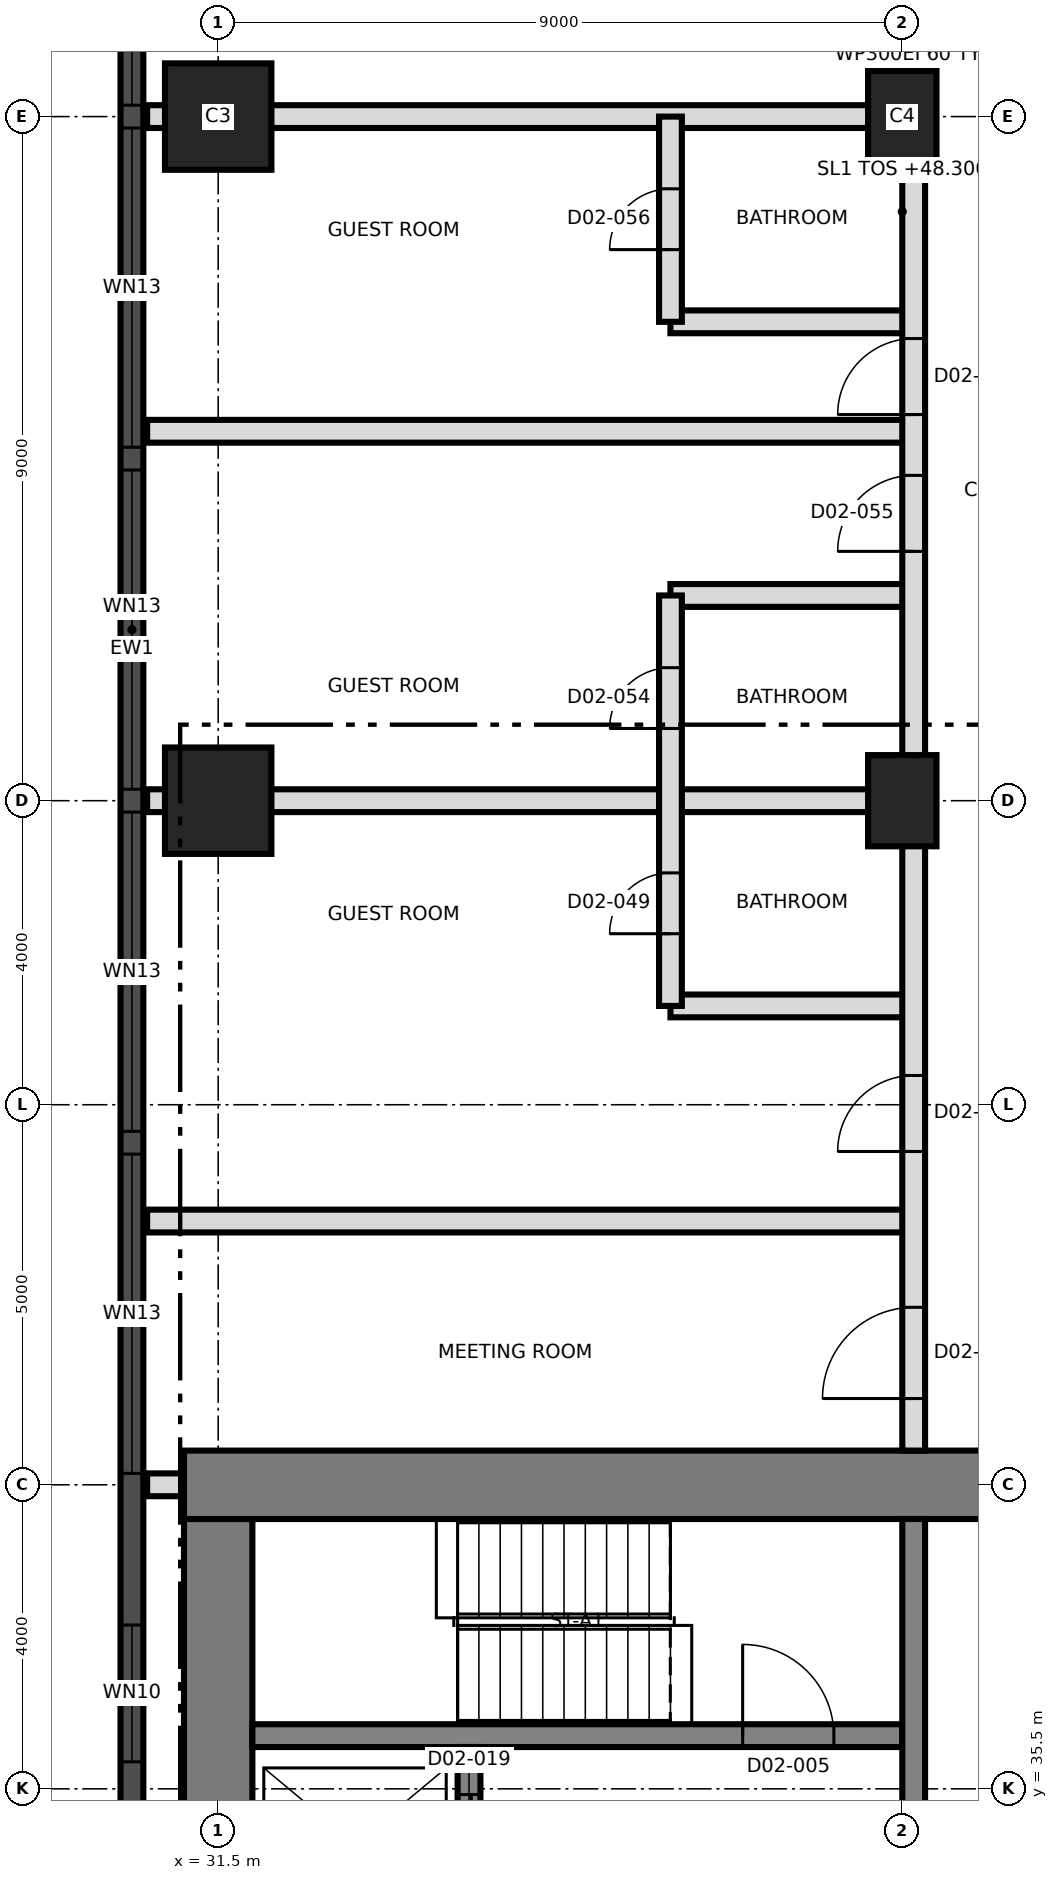
"""IFC4 building model, lengths in metres.
Left out: names, types, materials, properties, quantities, classifications, styles, units other than length and angle.
Written with IfcOpenShell. Run it as: python <this file> out.ifc"""

import sys

from ifc_helpers import new_model, si_unit, direction, frame, frame_2d, origin, origin_2d, place, context, subcontext, project, spatial, rectangle, extrude, element, fill, save


model = new_model("IFC4")
c1 = context("Model", 3, precision=1e-05, world=origin(), true_north=direction((0.0, 1.0)))
c2 = subcontext(c1, "Body", "Model", "MODEL_VIEW")
j1 = project(units=[si_unit("LENGTHUNIT", "METRE"), si_unit("PLANEANGLEUNIT", "RADIAN")], contexts=[c1])
p1 = place(None, origin())
s1 = spatial("IfcSite", under=j1, at=p1, CompositionType="ELEMENT")
p2 = place(p1, origin())
s2 = spatial("IfcBuilding", under=s1, at=p2, CompositionType="ELEMENT")
p3 = place(p2, frame((0.0, 0.0, 48.3)))
s3 = spatial("IfcBuildingStorey", under=s2, at=p3, CompositionType="ELEMENT", Elevation=48.3)
p4 = place(p3, frame((31.5, 21.95, 0.0), z_axis=(0.0, 0.0, 1.0), x_axis=(0.0, 1.0, 0.0)))
e1 = element("IfcWall", 1, at=p4, inside=s3, PredefinedType="SHEAR", context=c2, shape_type="SweptSolid", body=[
    extrude(rectangle(XDim=17.1, YDim=0.9, at=frame_2d((8.55, 0.0))), origin(), (0.0, 0.0, 1.0), 3.7),
])
p5 = place(p3, frame((31.05, 39.5, 0.0), z_axis=(0.0, 0.0, 1.0), x_axis=(1.0, 0.0, 0.0)))
e2 = element("IfcWall", 2, at=p5, inside=s3, PredefinedType="SHEAR", context=c2, shape_type="SweptSolid", body=[
    extrude(rectangle(XDim=27.0, YDim=0.9, at=frame_2d((13.5, 0.0))), origin(), (0.0, 0.0, 1.0), 3.7),
])
p6 = place(p5, frame((10.65, 0.0, 0.0)))
e3 = element("IfcOpeningElement", 3, at=p6, cuts=e2, PredefinedType="OPENING", context=c2, shape_type="SweptSolid", body=[
    extrude(rectangle(XDim=1.2, YDim=2.1, at=frame_2d((0.6, 1.05))), frame((0.0, 0.46, 0.0), z_axis=(0.0, -1.0, 0.0), x_axis=(1.0, 0.0, 0.0)), (0.0, 0.0, 1.0), 0.92),
])
p7 = place(p3, frame((31.95, 36.2, 0.0), z_axis=(0.0, 0.0, 1.0), x_axis=(1.0, 0.0, 0.0)))
e4 = element("IfcWall", 4, at=p7, inside=s3, PredefinedType="SHEAR", context=c2, shape_type="SweptSolid", body=[
    extrude(rectangle(XDim=8.55, YDim=0.3, at=frame_2d((4.275, 0.0))), origin(), (0.0, 0.0, 1.0), 3.7),
])
p8 = place(p7, frame((6.45, 0.0, 0.0)))
e5 = element("IfcOpeningElement", 5, at=p8, cuts=e4, PredefinedType="OPENING", context=c2, shape_type="SweptSolid", body=[
    extrude(rectangle(XDim=1.2, YDim=2.1, at=frame_2d((0.6, 1.05))), frame((0.0, 0.16, 0.0), z_axis=(0.0, -1.0, 0.0), x_axis=(1.0, 0.0, 0.0)), (0.0, 0.0, 1.0), 0.32),
])
p9 = place(p3, frame((40.65, 33.5, 0.0), z_axis=(0.0, 0.0, 1.0), x_axis=(0.0, 1.0, 0.0)))
e6 = element("IfcWall", 6, at=p9, inside=s3, PredefinedType="SHEAR", context=c2, shape_type="SweptSolid", body=[
    extrude(rectangle(XDim=5.55, YDim=0.3, at=frame_2d((2.775, 0.0))), origin(), (0.0, 0.0, 1.0), 3.7),
])
p10 = place(p3, frame((34.8, 33.5, 0.0), z_axis=(0.0, 0.0, 1.0), x_axis=(0.0, 1.0, 0.0)))
e7 = element("IfcWall", 7, at=p10, inside=s3, PredefinedType="SHEAR", context=c2, shape_type="SweptSolid", body=[
    extrude(rectangle(XDim=2.55, YDim=0.3, at=frame_2d((1.275, 0.0))), origin(), (0.0, 0.0, 1.0), 3.7),
])
p11 = place(p10, frame((0.625, 0.0, 0.0)))
e8 = element("IfcOpeningElement", 8, at=p11, cuts=e7, PredefinedType="OPENING", context=c2, shape_type="SweptSolid", body=[
    extrude(rectangle(XDim=1.3, YDim=2.4, at=frame_2d((0.65, 1.2))), frame((0.0, 0.16, 0.0), z_axis=(0.0, -1.0, 0.0), x_axis=(1.0, 0.0, 0.0)), (0.0, 0.0, 1.0), 0.32),
])
p12 = place(p3, frame((31.5, 48.5, 0.0), z_axis=(0.0, 0.0, 1.0), x_axis=(1.0, 0.0, 0.0)))
e9 = element("IfcColumn", 9, at=p12, inside=s3, PredefinedType="COLUMN", context=c2, shape_type="SweptSolid", body=[
    extrude(rectangle(XDim=1.4, YDim=1.4, at=origin_2d()), origin(), (0.0, 0.0, 1.0), 3.7),
])
p13 = place(p3, frame((40.5, 48.5, 0.0), z_axis=(0.0, 0.0, 1.0), x_axis=(0.0, 1.0, 0.0)))
e10 = element("IfcColumn", 10, at=p13, inside=s3, PredefinedType="COLUMN", context=c2, shape_type="SweptSolid", body=[
    extrude(rectangle(XDim=1.2, YDim=0.9, at=origin_2d()), origin(), (0.0, 0.0, 1.0), 3.7),
])
p14 = place(p3, frame((31.5, 57.5, 0.0), z_axis=(0.0, 0.0, 1.0), x_axis=(1.0, 0.0, 0.0)))
e11 = element("IfcColumn", 11, at=p14, inside=s3, PredefinedType="COLUMN", context=c2, shape_type="SweptSolid", body=[
    extrude(rectangle(XDim=1.4, YDim=1.4, at=origin_2d()), origin(), (0.0, 0.0, 1.0), 3.7),
])
p15 = place(p3, frame((40.5, 57.5, 0.0), z_axis=(0.0, 0.0, 1.0), x_axis=(0.0, 1.0, 0.0)))
e12 = element("IfcColumn", 12, at=p15, inside=s3, PredefinedType="COLUMN", context=c2, shape_type="SweptSolid", body=[
    extrude(rectangle(XDim=1.2, YDim=0.9, at=origin_2d()), origin(), (0.0, 0.0, 1.0), 3.7),
])
p16 = place(p3, frame((30.365, 66.992, 0.0), z_axis=(0.0, 0.0, 1.0), x_axis=(0.0, -1.0, 0.0)))
e13 = element("IfcWall", 13, at=p16, inside=s3, PredefinedType="SOLIDWALL", context=c2, shape_type="SweptSolid", body=[
    extrude(rectangle(XDim=32.981, YDim=0.3, at=frame_2d((16.491, 0.0))), origin(), (0.0, 0.0, 1.0), 3.4),
])
p17 = place(p16, frame((1.596, 0.0, 0.3)))
e14 = element("IfcOpeningElement", 14, at=p17, cuts=e13, PredefinedType="OPENING", context=c2, shape_type="SweptSolid", body=[
    extrude(rectangle(XDim=1.8, YDim=2.4, at=frame_2d((0.9, 1.2))), frame((0.0, 0.16, 0.0), z_axis=(0.0, -1.0, 0.0), x_axis=(1.0, 0.0, 0.0)), (0.0, 0.0, 1.0), 0.32),
])
p18 = place(p16, frame((5.142, 0.0, 0.9)))
e15 = element("IfcOpeningElement", 15, at=p18, cuts=e13, PredefinedType="OPENING", context=c2, shape_type="SweptSolid", body=[
    extrude(rectangle(XDim=4.2, YDim=1.7, at=frame_2d((2.1, 0.85))), frame((0.0, 0.16, 0.0), z_axis=(0.0, -1.0, 0.0), x_axis=(1.0, 0.0, 0.0)), (0.0, 0.0, 1.0), 0.32),
])
p19 = place(p16, frame((9.642, 0.0, 0.9)))
e16 = element("IfcOpeningElement", 16, at=p19, cuts=e13, PredefinedType="OPENING", context=c2, shape_type="SweptSolid", body=[
    extrude(rectangle(XDim=4.2, YDim=1.7, at=frame_2d((2.1, 0.85))), frame((0.0, 0.16, 0.0), z_axis=(0.0, -1.0, 0.0), x_axis=(1.0, 0.0, 0.0)), (0.0, 0.0, 1.0), 0.32),
])
p20 = place(p16, frame((14.142, 0.0, 0.9)))
e17 = element("IfcOpeningElement", 17, at=p20, cuts=e13, PredefinedType="OPENING", context=c2, shape_type="SweptSolid", body=[
    extrude(rectangle(XDim=4.2, YDim=1.7, at=frame_2d((2.1, 0.85))), frame((0.0, 0.16, 0.0), z_axis=(0.0, -1.0, 0.0), x_axis=(1.0, 0.0, 0.0)), (0.0, 0.0, 1.0), 0.32),
])
p21 = place(p16, frame((18.642, 0.0, 0.9)))
e18 = element("IfcOpeningElement", 18, at=p21, cuts=e13, PredefinedType="OPENING", context=c2, shape_type="SweptSolid", body=[
    extrude(rectangle(XDim=4.2, YDim=1.7, at=frame_2d((2.1, 0.85))), frame((0.0, 0.16, 0.0), z_axis=(0.0, -1.0, 0.0), x_axis=(1.0, 0.0, 0.0)), (0.0, 0.0, 1.0), 0.32),
])
p22 = place(p16, frame((23.142, 0.0, 0.9)))
e19 = element("IfcOpeningElement", 19, at=p22, cuts=e13, PredefinedType="OPENING", context=c2, shape_type="SweptSolid", body=[
    extrude(rectangle(XDim=4.2, YDim=1.7, at=frame_2d((2.1, 0.85))), frame((0.0, 0.16, 0.0), z_axis=(0.0, -1.0, 0.0), x_axis=(1.0, 0.0, 0.0)), (0.0, 0.0, 1.0), 0.32),
])
p23 = place(p16, frame((29.337, 0.0, 0.3)))
e20 = element("IfcOpeningElement", 20, at=p23, cuts=e13, PredefinedType="OPENING", context=c2, shape_type="SweptSolid", body=[
    extrude(rectangle(XDim=1.8, YDim=2.4, at=frame_2d((0.9, 1.2))), frame((0.0, 0.16, 0.0), z_axis=(0.0, -1.0, 0.0), x_axis=(1.0, 0.0, 0.0)), (0.0, 0.0, 1.0), 0.32),
])
p24 = place(p3, frame((30.565, 39.5, 0.0), z_axis=(0.0, 0.0, 1.0), x_axis=(1.0, 0.0, 0.0)))
e21 = element("IfcWall", 21, at=p24, inside=s3, PredefinedType="PARTITIONING", context=c2, shape_type="SweptSolid", body=[
    extrude(rectangle(XDim=0.465, YDim=0.3, at=frame_2d((0.232, 0.0))), origin(), (0.0, 0.0, 1.0), 3.4),
])
p25 = place(p3, frame((30.565, 42.97, 0.0), z_axis=(0.0, 0.0, 1.0), x_axis=(1.0, 0.0, 0.0)))
e22 = element("IfcWall", 22, at=p25, inside=s3, PredefinedType="PARTITIONING", context=c2, shape_type="SweptSolid", body=[
    extrude(rectangle(XDim=10.085, YDim=0.3, at=frame_2d((5.042, 0.0))), origin(), (0.0, 0.0, 1.0), 3.4),
])
p26 = place(p3, frame((37.45, 45.8, 0.0), z_axis=(0.0, 0.0, 1.0), x_axis=(1.0, 0.0, 0.0)))
e23 = element("IfcWall", 23, at=p26, inside=s3, PredefinedType="PARTITIONING", context=c2, shape_type="SweptSolid", body=[
    extrude(rectangle(XDim=3.2, YDim=0.3, at=frame_2d((1.6, 0.0))), origin(), (0.0, 0.0, 1.0), 3.4),
])
p27 = place(p3, frame((30.565, 48.5, 0.0), z_axis=(0.0, 0.0, 1.0), x_axis=(1.0, 0.0, 0.0)))
e24 = element("IfcWall", 24, at=p27, inside=s3, PredefinedType="PARTITIONING", context=c2, shape_type="SweptSolid", body=[
    extrude(rectangle(XDim=10.085, YDim=0.3, at=frame_2d((5.042, 0.0))), origin(), (0.0, 0.0, 1.0), 3.4),
])
p28 = place(p3, frame((37.45, 51.2, 0.0), z_axis=(0.0, 0.0, 1.0), x_axis=(1.0, 0.0, 0.0)))
e25 = element("IfcWall", 25, at=p28, inside=s3, PredefinedType="PARTITIONING", context=c2, shape_type="SweptSolid", body=[
    extrude(rectangle(XDim=3.2, YDim=0.3, at=frame_2d((1.6, 0.0))), origin(), (0.0, 0.0, 1.0), 3.4),
])
p29 = place(p3, frame((30.565, 53.36, 0.0), z_axis=(0.0, 0.0, 1.0), x_axis=(1.0, 0.0, 0.0)))
e26 = element("IfcWall", 26, at=p29, inside=s3, PredefinedType="PARTITIONING", context=c2, shape_type="SweptSolid", body=[
    extrude(rectangle(XDim=10.085, YDim=0.3, at=frame_2d((5.042, 0.0))), origin(), (0.0, 0.0, 1.0), 3.4),
])
p30 = place(p3, frame((37.45, 54.8, 0.0), z_axis=(0.0, 0.0, 1.0), x_axis=(1.0, 0.0, 0.0)))
e27 = element("IfcWall", 27, at=p30, inside=s3, PredefinedType="PARTITIONING", context=c2, shape_type="SweptSolid", body=[
    extrude(rectangle(XDim=3.2, YDim=0.3, at=frame_2d((1.6, 0.0))), origin(), (0.0, 0.0, 1.0), 3.4),
])
p31 = place(p3, frame((30.565, 57.5, 0.0), z_axis=(0.0, 0.0, 1.0), x_axis=(1.0, 0.0, 0.0)))
e28 = element("IfcWall", 28, at=p31, inside=s3, PredefinedType="PARTITIONING", context=c2, shape_type="SweptSolid", body=[
    extrude(rectangle(XDim=10.085, YDim=0.3, at=frame_2d((5.042, 0.0))), origin(), (0.0, 0.0, 1.0), 3.4),
])
p32 = place(p3, frame((37.45, 45.8, 0.0), z_axis=(0.0, 0.0, 1.0), x_axis=(0.0, 1.0, 0.0)))
e29 = element("IfcWall", 29, at=p32, inside=s3, PredefinedType="PARTITIONING", context=c2, shape_type="SweptSolid", body=[
    extrude(rectangle(XDim=5.4, YDim=0.3, at=frame_2d((2.7, 0.0))), origin(), (0.0, 0.0, 1.0), 3.4),
])
p33 = place(p32, frame((0.95, 0.0, 0.0)))
e30 = element("IfcOpeningElement", 30, at=p33, cuts=e29, PredefinedType="OPENING", context=c2, shape_type="SweptSolid", body=[
    extrude(rectangle(XDim=0.8, YDim=2.1, at=frame_2d((0.4, 1.05))), frame((0.0, 0.16, 0.0), z_axis=(0.0, -1.0, 0.0), x_axis=(1.0, 0.0, 0.0)), (0.0, 0.0, 1.0), 0.32),
])
p34 = place(p32, frame((3.65, 0.0, 0.0)))
e31 = element("IfcOpeningElement", 31, at=p34, cuts=e29, PredefinedType="OPENING", context=c2, shape_type="SweptSolid", body=[
    extrude(rectangle(XDim=0.8, YDim=2.1, at=frame_2d((0.4, 1.05))), frame((0.0, 0.16, 0.0), z_axis=(0.0, -1.0, 0.0), x_axis=(1.0, 0.0, 0.0)), (0.0, 0.0, 1.0), 0.32),
])
p35 = place(p3, frame((37.45, 54.8, 0.0), z_axis=(0.0, 0.0, 1.0), x_axis=(0.0, 1.0, 0.0)))
e32 = element("IfcWall", 32, at=p35, inside=s3, PredefinedType="PARTITIONING", context=c2, shape_type="SweptSolid", body=[
    extrude(rectangle(XDim=2.7, YDim=0.3, at=frame_2d((1.35, 0.0))), origin(), (0.0, 0.0, 1.0), 3.4),
])
p36 = place(p35, frame((0.95, 0.0, 0.0)))
e33 = element("IfcOpeningElement", 33, at=p36, cuts=e32, PredefinedType="OPENING", context=c2, shape_type="SweptSolid", body=[
    extrude(rectangle(XDim=0.8, YDim=2.1, at=frame_2d((0.4, 1.05))), frame((0.0, 0.16, 0.0), z_axis=(0.0, -1.0, 0.0), x_axis=(1.0, 0.0, 0.0)), (0.0, 0.0, 1.0), 0.32),
])
p37 = place(p3, frame((40.65, 39.95, 0.0), z_axis=(0.0, 0.0, 1.0), x_axis=(0.0, 1.0, 0.0)))
e34 = element("IfcWall", 34, at=p37, inside=s3, PredefinedType="PARTITIONING", context=c2, shape_type="SweptSolid", body=[
    extrude(rectangle(XDim=36.725, YDim=0.3, at=frame_2d((18.363, 0.0))), origin(), (0.0, 0.0, 1.0), 3.4),
])
p38 = place(p37, frame((0.685, 0.0, 0.0)))
e35 = element("IfcOpeningElement", 35, at=p38, cuts=e34, PredefinedType="OPENING", context=c2, shape_type="SweptSolid", body=[
    extrude(rectangle(XDim=1.2, YDim=2.1, at=frame_2d((0.6, 1.05))), frame((0.0, 0.16, 0.0), z_axis=(0.0, -1.0, 0.0), x_axis=(1.0, 0.0, 0.0)), (0.0, 0.0, 1.0), 0.32),
])
p39 = place(p37, frame((3.935, 0.0, 0.0)))
e36 = element("IfcOpeningElement", 36, at=p39, cuts=e34, PredefinedType="OPENING", context=c2, shape_type="SweptSolid", body=[
    extrude(rectangle(XDim=1.0, YDim=2.1, at=frame_2d((0.5, 1.05))), frame((0.0, 0.16, 0.0), z_axis=(0.0, -1.0, 0.0), x_axis=(1.0, 0.0, 0.0)), (0.0, 0.0, 1.0), 0.32),
])
p40 = place(p37, frame((11.83, 0.0, 0.0)))
e37 = element("IfcOpeningElement", 37, at=p40, cuts=e34, PredefinedType="OPENING", context=c2, shape_type="SweptSolid", body=[
    extrude(rectangle(XDim=1.0, YDim=2.1, at=frame_2d((0.5, 1.05))), frame((0.0, 0.16, 0.0), z_axis=(0.0, -1.0, 0.0), x_axis=(1.0, 0.0, 0.0)), (0.0, 0.0, 1.0), 0.32),
])
p41 = place(p37, frame((13.63, 0.0, 0.0)))
e38 = element("IfcOpeningElement", 38, at=p41, cuts=e34, PredefinedType="OPENING", context=c2, shape_type="SweptSolid", body=[
    extrude(rectangle(XDim=1.0, YDim=2.1, at=frame_2d((0.5, 1.05))), frame((0.0, 0.16, 0.0), z_axis=(0.0, -1.0, 0.0), x_axis=(1.0, 0.0, 0.0)), (0.0, 0.0, 1.0), 0.32),
])
p42 = place(p37, frame((21.05, 0.0, 0.0)))
e39 = element("IfcOpeningElement", 39, at=p42, cuts=e34, PredefinedType="OPENING", context=c2, shape_type="SweptSolid", body=[
    extrude(rectangle(XDim=1.0, YDim=2.4, at=frame_2d((0.5, 1.2))), frame((0.0, 0.16, 0.0), z_axis=(0.0, -1.0, 0.0), x_axis=(1.0, 0.0, 0.0)), (0.0, 0.0, 1.0), 0.32),
])
p43 = place(p18, origin())
e40 = element("IfcWindow", 40, at=p43, inside=s3, PartitioningType="SINGLE_PANEL", PredefinedType="WINDOW", context=c2, shape_type="SweptSolid", body=[
    extrude(rectangle(XDim=4.2, YDim=1.7, at=frame_2d((2.1, 0.85))), frame((0.0, 0.03, 0.0), z_axis=(0.0, -1.0, 0.0), x_axis=(1.0, 0.0, 0.0)), (0.0, 0.0, 1.0), 0.06),
])
fill(e15, e40)
p44 = place(p19, origin())
e41 = element("IfcWindow", 41, at=p44, inside=s3, PartitioningType="SINGLE_PANEL", PredefinedType="WINDOW", context=c2, shape_type="SweptSolid", body=[
    extrude(rectangle(XDim=4.2, YDim=1.7, at=frame_2d((2.1, 0.85))), frame((0.0, 0.03, 0.0), z_axis=(0.0, -1.0, 0.0), x_axis=(1.0, 0.0, 0.0)), (0.0, 0.0, 1.0), 0.06),
])
fill(e16, e41)
p45 = place(p20, origin())
e42 = element("IfcWindow", 42, at=p45, inside=s3, PartitioningType="SINGLE_PANEL", PredefinedType="WINDOW", context=c2, shape_type="SweptSolid", body=[
    extrude(rectangle(XDim=4.2, YDim=1.7, at=frame_2d((2.1, 0.85))), frame((0.0, 0.03, 0.0), z_axis=(0.0, -1.0, 0.0), x_axis=(1.0, 0.0, 0.0)), (0.0, 0.0, 1.0), 0.06),
])
fill(e17, e42)
p46 = place(p21, origin())
e43 = element("IfcWindow", 43, at=p46, inside=s3, PartitioningType="SINGLE_PANEL", PredefinedType="WINDOW", context=c2, shape_type="SweptSolid", body=[
    extrude(rectangle(XDim=4.2, YDim=1.7, at=frame_2d((2.1, 0.85))), frame((0.0, 0.03, 0.0), z_axis=(0.0, -1.0, 0.0), x_axis=(1.0, 0.0, 0.0)), (0.0, 0.0, 1.0), 0.06),
])
fill(e18, e43)
p47 = place(p22, origin())
e44 = element("IfcWindow", 44, at=p47, inside=s3, PartitioningType="SINGLE_PANEL", PredefinedType="WINDOW", context=c2, shape_type="SweptSolid", body=[
    extrude(rectangle(XDim=4.2, YDim=1.7, at=frame_2d((2.1, 0.85))), frame((0.0, 0.03, 0.0), z_axis=(0.0, -1.0, 0.0), x_axis=(1.0, 0.0, 0.0)), (0.0, 0.0, 1.0), 0.06),
])
fill(e19, e44)
p48 = place(p23, origin())
e45 = element("IfcWindow", 45, at=p48, inside=s3, PartitioningType="SINGLE_PANEL", PredefinedType="WINDOW", context=c2, shape_type="SweptSolid", body=[
    extrude(rectangle(XDim=1.8, YDim=2.4, at=frame_2d((0.9, 1.2))), frame((0.0, 0.03, 0.0), z_axis=(0.0, -1.0, 0.0), x_axis=(1.0, 0.0, 0.0)), (0.0, 0.0, 1.0), 0.06),
])
fill(e20, e45)
p49 = place(p8, origin())
e46 = element("IfcDoor", 46, at=p49, inside=s3, OperationType="SINGLE_SWING_RIGHT", PredefinedType="DOOR", context=c2, shape_type="SweptSolid", body=[
    extrude(rectangle(XDim=1.2, YDim=2.1, at=frame_2d((0.6, 1.05))), frame((0.0, 0.025, 0.0), z_axis=(0.0, -1.0, 0.0), x_axis=(1.0, 0.0, 0.0)), (0.0, 0.0, 1.0), 0.05),
])
fill(e5, e46)
p50 = place(p11, origin())
e47 = element("IfcDoor", 47, at=p50, inside=s3, OperationType="SLIDING_TO_LEFT", PredefinedType="DOOR", context=c2, shape_type="SweptSolid", body=[
    extrude(rectangle(XDim=1.3, YDim=2.4, at=frame_2d((0.65, 1.2))), frame((0.0, 0.025, 0.0), z_axis=(0.0, -1.0, 0.0), x_axis=(1.0, 0.0, 0.0)), (0.0, 0.0, 1.0), 0.05),
])
fill(e8, e47)
p51 = place(p38, origin())
e48 = element("IfcDoor", 48, at=p51, inside=s3, OperationType="SINGLE_SWING_LEFT", PredefinedType="DOOR", context=c2, shape_type="SweptSolid", body=[
    extrude(rectangle(XDim=1.2, YDim=2.1, at=frame_2d((0.6, 1.05))), frame((0.0, 0.025, 0.0), z_axis=(0.0, -1.0, 0.0), x_axis=(1.0, 0.0, 0.0)), (0.0, 0.0, 1.0), 0.05),
])
fill(e35, e48)
p52 = place(p33, origin())
e49 = element("IfcDoor", 49, at=p52, inside=s3, OperationType="SINGLE_SWING_LEFT", PredefinedType="DOOR", context=c2, shape_type="SweptSolid", body=[
    extrude(rectangle(XDim=0.8, YDim=2.1, at=frame_2d((0.4, 1.05))), frame((0.0, 0.025, 0.0), z_axis=(0.0, -1.0, 0.0), x_axis=(1.0, 0.0, 0.0)), (0.0, 0.0, 1.0), 0.05),
])
fill(e30, e49)
p53 = place(p39, origin())
e50 = element("IfcDoor", 50, at=p53, inside=s3, OperationType="SINGLE_SWING_RIGHT", PredefinedType="DOOR", context=c2, shape_type="SweptSolid", body=[
    extrude(rectangle(XDim=1.0, YDim=2.1, at=frame_2d((0.5, 1.05))), frame((0.0, 0.025, 0.0), z_axis=(0.0, -1.0, 0.0), x_axis=(1.0, 0.0, 0.0)), (0.0, 0.0, 1.0), 0.05),
])
fill(e36, e50)
p54 = place(p34, origin())
e51 = element("IfcDoor", 51, at=p54, inside=s3, OperationType="SINGLE_SWING_RIGHT", PredefinedType="DOOR", context=c2, shape_type="SweptSolid", body=[
    extrude(rectangle(XDim=0.8, YDim=2.1, at=frame_2d((0.4, 1.05))), frame((0.0, 0.025, 0.0), z_axis=(0.0, -1.0, 0.0), x_axis=(1.0, 0.0, 0.0)), (0.0, 0.0, 1.0), 0.05),
])
fill(e31, e51)
p55 = place(p40, origin())
e52 = element("IfcDoor", 52, at=p55, inside=s3, OperationType="SINGLE_SWING_LEFT", PredefinedType="DOOR", context=c2, shape_type="SweptSolid", body=[
    extrude(rectangle(XDim=1.0, YDim=2.1, at=frame_2d((0.5, 1.05))), frame((0.0, 0.025, 0.0), z_axis=(0.0, -1.0, 0.0), x_axis=(1.0, 0.0, 0.0)), (0.0, 0.0, 1.0), 0.05),
])
fill(e37, e52)
p56 = place(p36, origin())
e53 = element("IfcDoor", 53, at=p56, inside=s3, OperationType="SINGLE_SWING_LEFT", PredefinedType="DOOR", context=c2, shape_type="SweptSolid", body=[
    extrude(rectangle(XDim=0.8, YDim=2.1, at=frame_2d((0.4, 1.05))), frame((0.0, 0.025, 0.0), z_axis=(0.0, -1.0, 0.0), x_axis=(1.0, 0.0, 0.0)), (0.0, 0.0, 1.0), 0.05),
])
fill(e33, e53)
p57 = place(p41, origin())
e54 = element("IfcDoor", 54, at=p57, inside=s3, OperationType="SINGLE_SWING_LEFT", PredefinedType="DOOR", context=c2, shape_type="SweptSolid", body=[
    extrude(rectangle(XDim=1.0, YDim=2.1, at=frame_2d((0.5, 1.05))), frame((0.0, 0.025, 0.0), z_axis=(0.0, -1.0, 0.0), x_axis=(1.0, 0.0, 0.0)), (0.0, 0.0, 1.0), 0.05),
])
fill(e38, e54)
save(model, sys.argv[1])
